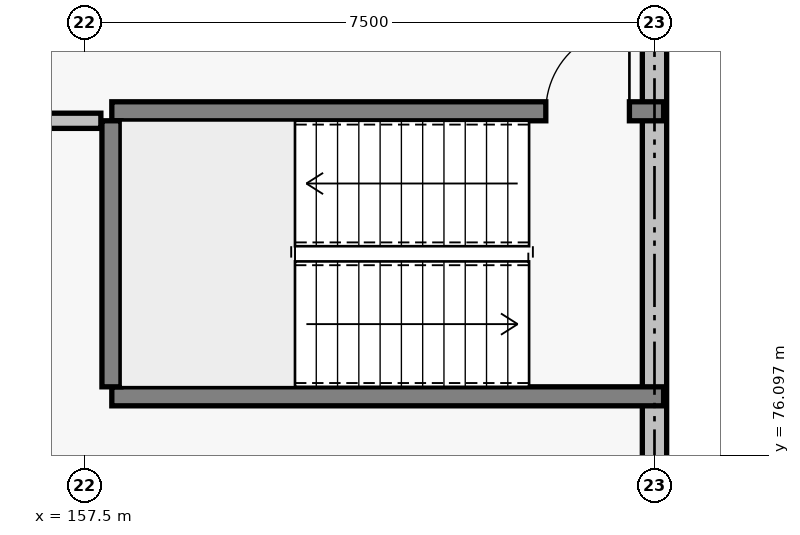
"""IFC4 building model, lengths in metres.
Left out: names, types, materials, properties, quantities, classifications, styles, units other than length and angle.
Written with IfcOpenShell. Run it as: python <this file> out.ifc"""

import sys

from ifc_helpers import new_model, si_unit, direction, frame, frame_2d, origin, place, context, subcontext, project, spatial, rectangle, extrude, element, fill, save


model = new_model("IFC4")
c1 = context("Model", 3, precision=1e-05, world=origin(), true_north=direction((0.0, 1.0)))
c2 = subcontext(c1, "Body", "Model", "MODEL_VIEW")
j1 = project(units=[si_unit("LENGTHUNIT", "METRE"), si_unit("PLANEANGLEUNIT", "RADIAN")], contexts=[c1])
p1 = place(None, origin())
s1 = spatial("IfcSite", under=j1, at=p1, CompositionType="ELEMENT")
p2 = place(p1, origin())
s2 = spatial("IfcBuilding", under=s1, at=p2, CompositionType="ELEMENT")
p3 = place(p2, frame((0.0, 0.0, 4.8)))
s3 = spatial("IfcBuildingStorey", under=s2, at=p3, CompositionType="ELEMENT", Elevation=4.8)
p4 = place(p3, frame((165.0, 75.355, 0.0), z_axis=(0.0, 0.0, 1.0), x_axis=(0.0, 1.0, 0.0)))
e1 = element("IfcWall", 1, at=p4, inside=s3, PredefinedType="SOLIDWALL", context=c2, shape_type="SweptSolid", body=[
    extrude(rectangle(XDim=6.79, YDim=0.32, at=frame_2d((3.395, 0.0))), origin(), (0.0, 0.0, 1.0), 3.09),
])
p5 = place(p3, frame((157.86, 76.875, 0.0), z_axis=(0.0, 0.0, 1.0), x_axis=(1.0, 0.0, 0.0)))
e2 = element("IfcWall", 2, at=p5, inside=s3, PredefinedType="SOLIDWALL", context=c2, shape_type="SweptSolid", body=[
    extrude(rectangle(XDim=7.26, YDim=0.25, at=frame_2d((3.63, 0.0))), origin(), (0.0, 0.0, 1.0), 3.92),
])
p6 = place(p3, frame((157.86, 80.625, 0.0), z_axis=(0.0, 0.0, 1.0), x_axis=(1.0, 0.0, 0.0)))
e3 = element("IfcWall", 3, at=p6, inside=s3, PredefinedType="SOLIDWALL", context=c2, shape_type="SweptSolid", body=[
    extrude(rectangle(XDim=7.26, YDim=0.25, at=frame_2d((3.63, 0.0))), origin(), (0.0, 0.0, 1.0), 3.92),
])
p7 = place(p6, frame((5.71, 0.0, 0.0)))
e4 = element("IfcOpeningElement", 4, at=p7, cuts=e3, PredefinedType="OPENING", context=c2, shape_type="SweptSolid", body=[
    extrude(rectangle(XDim=1.1, YDim=2.15, at=frame_2d((0.55, 1.075))), frame((0.0, 0.135, 0.0), z_axis=(0.0, -1.0, 0.0), x_axis=(1.0, 0.0, 0.0)), (0.0, 0.0, 1.0), 0.27),
])
p8 = place(p3, frame((157.855, 77.0, 0.0), z_axis=(0.0, 0.0, 1.0), x_axis=(0.0, 1.0, 0.0)))
e5 = element("IfcWall", 5, at=p8, inside=s3, PredefinedType="SOLIDWALL", context=c2, shape_type="SweptSolid", body=[
    extrude(rectangle(XDim=3.5, YDim=0.25, at=frame_2d((1.75, 0.0))), origin(), (0.0, 0.0, 1.0), 3.92),
])
p9 = place(p3, frame((154.5, 80.5, 0.0), z_axis=(0.0, 0.0, 1.0), x_axis=(1.0, 0.0, 0.0)))
e6 = element("IfcWall", 6, at=p9, inside=s3, PredefinedType="PARTITIONING", context=c2, shape_type="SweptSolid", body=[
    extrude(rectangle(XDim=3.216, YDim=0.2, at=frame_2d((1.608, 0.0))), origin(), (0.0, 0.0, 1.0), 3.19),
])
p10 = place(p7, origin())
e7 = element("IfcDoor", 7, at=p10, inside=s3, OperationType="SINGLE_SWING_RIGHT", PredefinedType="DOOR", context=c2, shape_type="SweptSolid", body=[
    extrude(rectangle(XDim=1.1, YDim=2.15, at=frame_2d((0.55, 1.075))), frame((0.0, 0.025, 0.0), z_axis=(0.0, -1.0, 0.0), x_axis=(1.0, 0.0, 0.0)), (0.0, 0.0, 1.0), 0.05),
])
fill(e4, e7)
save(model, sys.argv[1])
